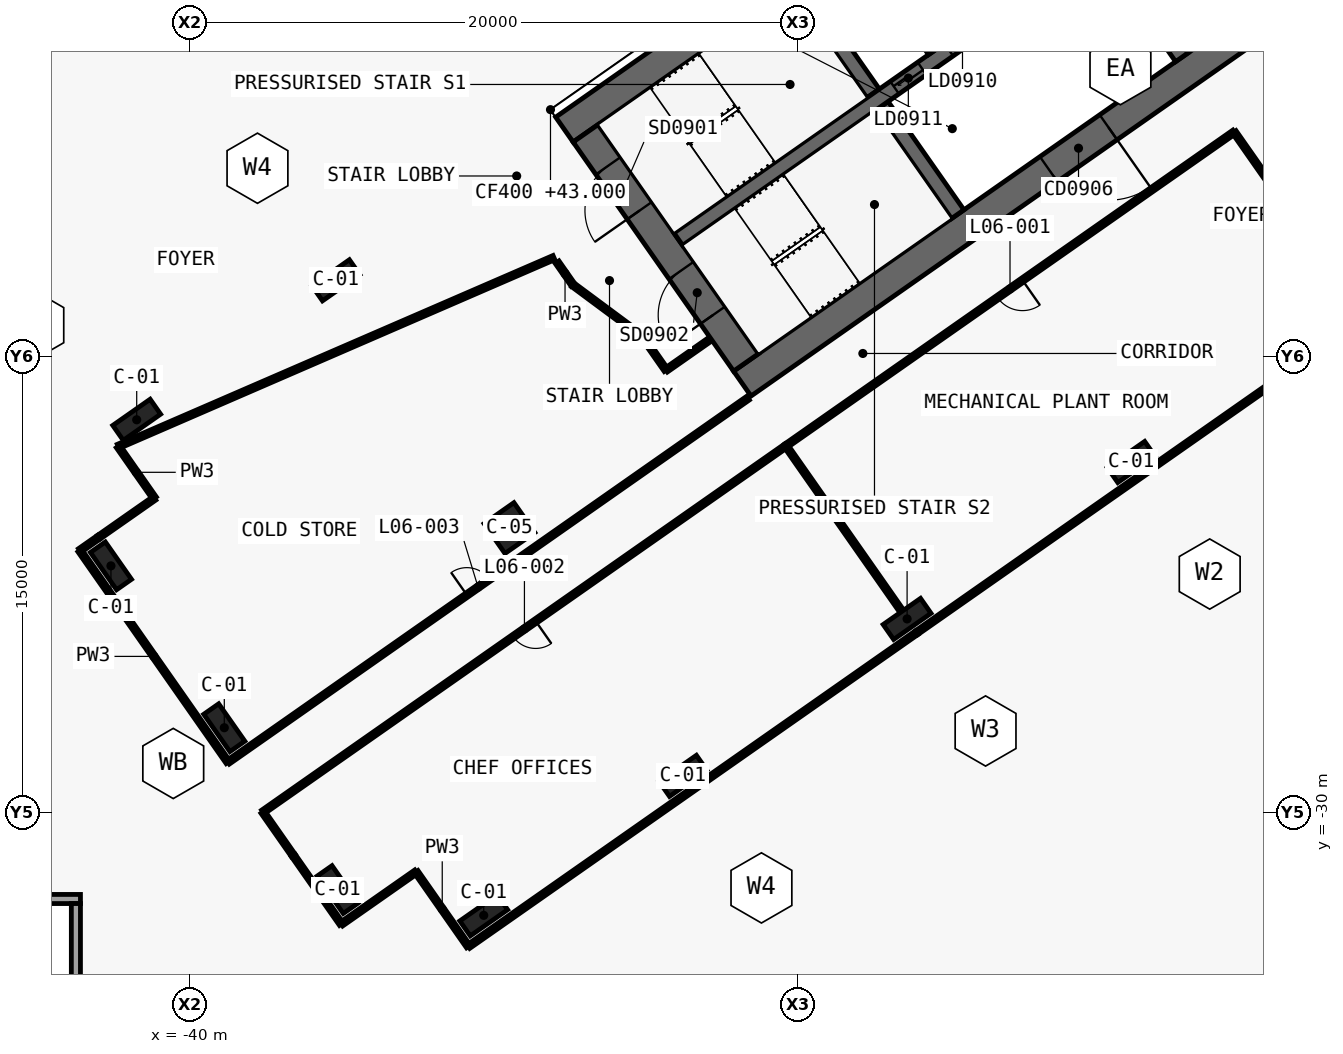
"""IFC4 building model, lengths in metres.
Left out: names, types, materials, properties, quantities, classifications, styles, units other than length and angle.
Written with IfcOpenShell. Run it as: python <this file> out.ifc"""

import sys

from ifc_helpers import new_model, si_unit, direction, frame, frame_2d, origin, origin_2d, place, context, subcontext, project, spatial, polyline, rectangle, outline, extrude, element, fill, save


model = new_model("IFC4")
c1 = context("Model", 3, precision=1e-05, world=origin(), true_north=direction((0.0, 1.0)))
c2 = subcontext(c1, "Body", "Model", "MODEL_VIEW")
j1 = project(units=[si_unit("LENGTHUNIT", "METRE"), si_unit("PLANEANGLEUNIT", "RADIAN")], contexts=[c1])
p1 = place(None, origin())
s1 = spatial("IfcSite", under=j1, at=p1, CompositionType="ELEMENT")
p2 = place(p1, origin())
s2 = spatial("IfcBuilding", under=s1, at=p2, CompositionType="ELEMENT")
p3 = place(p2, frame((0.0, 0.0, 43.0)))
s3 = spatial("IfcBuildingStorey", under=s2, at=p3, CompositionType="ELEMENT", Elevation=43.0)
p4 = place(p3, frame((0.037, 11.867, 0.0), z_axis=(0.0, 0.0, 1.0), x_axis=(-0.819155306259, -0.573571777746, 0.0)))
e1 = element("IfcWall", 1, at=p4, inside=s3, PredefinedType="SHEAR", context=c2, shape_type="SweptSolid", body=[
    extrude(outline(polyline([(33.837, 0.5), (0.7, 0.5), (0.0, -0.5), (33.837, -0.5), (33.837, 0.5)])), origin(), (0.0, 0.0, 1.0), 5.5),
])
p5 = place(p3, frame((0.037, -0.585, 0.0), z_axis=(0.0, 0.0, 1.0), x_axis=(-0.819157152511, -0.573569140985, 0.0)))
e2 = element("IfcWall", 2, at=p5, inside=s3, PredefinedType="SHEAR", context=c2, shape_type="SweptSolid", body=[
    extrude(outline(polyline([(26.695, 0.5), (0.7, 0.5), (0.0, -0.5), (26.695, -0.5), (26.695, 0.5)])), origin(), (0.0, 0.0, 1.0), 5.5),
])
p6 = place(p5, frame((2.995, 0.0, 0.0)))
e3 = element("IfcOpeningElement", 3, at=p6, cuts=e2, PredefinedType="OPENING", context=c2, shape_type="SweptSolid", body=[
    extrude(rectangle(XDim=2.4, YDim=2.1, at=frame_2d((1.2, 1.05))), frame((0.0, 0.51, 0.0), z_axis=(0.0, -1.0, 0.0), x_axis=(1.0, 0.0, 0.0)), (0.0, 0.0, 1.0), 1.02),
])
p7 = place(p5, frame((11.995, 0.0, 0.0)))
e4 = element("IfcOpeningElement", 4, at=p7, cuts=e2, PredefinedType="OPENING", context=c2, shape_type="SweptSolid", body=[
    extrude(rectangle(XDim=2.4, YDim=2.1, at=frame_2d((1.2, 1.05))), frame((0.0, 0.51, 0.0), z_axis=(0.0, -1.0, 0.0), x_axis=(1.0, 0.0, 0.0)), (0.0, 0.0, 1.0), 1.02),
])
p8 = place(p3, frame((-21.708, -15.2, 0.0), z_axis=(0.0, 0.0, 1.0), x_axis=(-0.573576324356, 0.819152122709, 0.0)))
e5 = element("IfcWall", 5, at=p8, inside=s3, PredefinedType="SHEAR", context=c2, shape_type="SweptSolid", body=[
    extrude(outline(polyline([(0.0, 0.5), (0.0, -0.5), (9.2, -0.5), (9.2, 0.5), (0.0, 0.5)])), origin(), (0.0, 0.0, 1.0), 5.5),
])
p9 = place(p8, frame((6.1, 0.0, 0.0)))
e6 = element("IfcOpeningElement", 6, at=p9, cuts=e5, PredefinedType="OPENING", context=c2, shape_type="SweptSolid", body=[
    extrude(rectangle(XDim=1.8, YDim=2.1, at=frame_2d((0.9, 1.05))), frame((0.0, 0.51, 0.0), z_axis=(0.0, -1.0, 0.0), x_axis=(1.0, 0.0, 0.0)), (0.0, 0.0, 1.0), 1.02),
])
p10 = place(p8, frame((1.9, 0.0, 0.0)))
e7 = element("IfcOpeningElement", 7, at=p10, cuts=e5, PredefinedType="OPENING", context=c2, shape_type="SweptSolid", body=[
    extrude(rectangle(XDim=1.8, YDim=2.1, at=frame_2d((0.9, 1.05))), frame((0.0, 0.51, 0.0), z_axis=(0.0, -1.0, 0.0), x_axis=(1.0, 0.0, 0.0)), (0.0, 0.0, 1.0), 1.02),
])
p11 = place(p3, frame((-7.372, -5.162, 0.0), z_axis=(0.0, 0.0, 1.0), x_axis=(-0.573594173421, 0.819139624372, 0.0)))
e8 = element("IfcWall", 8, at=p11, inside=s3, PredefinedType="SHEAR", context=c2, shape_type="SweptSolid", body=[
    extrude(outline(polyline([(4.35, 0.25), (0.0, 0.25), (0.0, -0.25), (4.35, -0.25), (4.35, 0.25)])), origin(), (0.0, 0.0, 1.0), 5.5),
])
p12 = place(p3, frame((-14.745, -10.324, 0.0), z_axis=(0.0, 0.0, 1.0), x_axis=(-0.57356780395, 0.819158088694, 0.0)))
e9 = element("IfcWall", 9, at=p12, inside=s3, PredefinedType="SHEAR", context=c2, shape_type="SweptSolid", body=[
    extrude(outline(polyline([(4.35, 0.25), (0.0, 0.25), (0.0, -0.25), (4.35, -0.25), (4.35, 0.25)])), origin(), (0.0, 0.0, 1.0), 5.5),
])
p13 = place(p3, frame((-17.527, -6.352, 0.0), z_axis=(0.0, 0.0, 1.0), x_axis=(-0.573530143085, 0.819184457233, 0.0)))
e10 = element("IfcWall", 10, at=p13, inside=s3, PredefinedType="SHEAR", context=c2, shape_type="SweptSolid", body=[
    extrude(outline(polyline([(4.35, -0.25), (4.35, 0.25), (0.0, 0.25), (0.0, -0.25), (4.35, -0.25)])), origin(), (0.0, 0.0, 1.0), 5.5),
])
p14 = place(p3, frame((-2.638, 3.768, 0.0), z_axis=(0.0, 0.0, 1.0), x_axis=(-0.819148977158, -0.573580816643, 0.0)))
e11 = element("IfcWall", 11, at=p14, inside=s3, PredefinedType="SHEAR", context=c2, shape_type="SweptSolid", body=[
    extrude(outline(polyline([(26.0, 0.25), (0.0, 0.25), (0.0, -0.25), (26.0, -0.25), (26.0, 0.25)])), origin(), (0.0, 0.0, 1.0), 5.5),
])
p15 = place(p14, frame((1.169, 0.0, 0.0)))
e12 = element("IfcOpeningElement", 12, at=p15, cuts=e11, PredefinedType="OPENING", context=c2, shape_type="SweptSolid", body=[
    extrude(rectangle(XDim=1.1, YDim=2.1, at=frame_2d((0.55, 1.05))), frame((0.0, 0.26, 0.0), z_axis=(0.0, -1.0, 0.0), x_axis=(1.0, 0.0, 0.0)), (0.0, 0.0, 1.0), 0.52),
])
p16 = place(p14, frame((3.206, 0.0, 0.0)))
e13 = element("IfcOpeningElement", 13, at=p16, cuts=e11, PredefinedType="OPENING", context=c2, shape_type="SweptSolid", body=[
    extrude(rectangle(XDim=1.1, YDim=2.1, at=frame_2d((0.55, 1.05))), frame((0.0, 0.26, 0.0), z_axis=(0.0, -1.0, 0.0), x_axis=(1.0, 0.0, 0.0)), (0.0, 0.0, 1.0), 0.52),
])
p17 = place(p14, frame((5.244, 0.0, 0.0)))
e14 = element("IfcOpeningElement", 14, at=p17, cuts=e11, PredefinedType="OPENING", context=c2, shape_type="SweptSolid", body=[
    extrude(rectangle(XDim=1.1, YDim=2.1, at=frame_2d((0.55, 1.05))), frame((0.0, 0.26, 0.0), z_axis=(0.0, -1.0, 0.0), x_axis=(1.0, 0.0, 0.0)), (0.0, 0.0, 1.0), 0.52),
])
p18 = place(p14, frame((7.281, 0.0, 0.0)))
e15 = element("IfcOpeningElement", 15, at=p18, cuts=e11, PredefinedType="OPENING", context=c2, shape_type="SweptSolid", body=[
    extrude(rectangle(XDim=1.1, YDim=2.1, at=frame_2d((0.55, 1.05))), frame((0.0, 0.26, 0.0), z_axis=(0.0, -1.0, 0.0), x_axis=(1.0, 0.0, 0.0)), (0.0, 0.0, 1.0), 0.52),
])
p19 = place(p14, frame((9.688, 0.0, 0.0)))
e16 = element("IfcOpeningElement", 16, at=p19, cuts=e11, PredefinedType="OPENING", context=c2, shape_type="SweptSolid", body=[
    extrude(rectangle(XDim=1.1, YDim=2.1, at=frame_2d((0.55, 1.05))), frame((0.0, 0.26, 0.0), z_axis=(0.0, -1.0, 0.0), x_axis=(1.0, 0.0, 0.0)), (0.0, 0.0, 1.0), 0.52),
])
p20 = place(p14, frame((11.863, 0.0, 0.0)))
e17 = element("IfcOpeningElement", 17, at=p20, cuts=e11, PredefinedType="OPENING", context=c2, shape_type="SweptSolid", body=[
    extrude(rectangle(XDim=1.1, YDim=2.1, at=frame_2d((0.55, 1.05))), frame((0.0, 0.26, 0.0), z_axis=(0.0, -1.0, 0.0), x_axis=(1.0, 0.0, 0.0)), (0.0, 0.0, 1.0), 0.52),
])
p21 = place(p14, frame((14.038, 0.0, 0.0)))
e18 = element("IfcOpeningElement", 18, at=p21, cuts=e11, PredefinedType="OPENING", context=c2, shape_type="SweptSolid", body=[
    extrude(rectangle(XDim=1.1, YDim=2.1, at=frame_2d((0.55, 1.05))), frame((0.0, 0.26, 0.0), z_axis=(0.0, -1.0, 0.0), x_axis=(1.0, 0.0, 0.0)), (0.0, 0.0, 1.0), 0.52),
])
p22 = place(p14, frame((16.212, 0.0, 0.0)))
e19 = element("IfcOpeningElement", 19, at=p22, cuts=e11, PredefinedType="OPENING", context=c2, shape_type="SweptSolid", body=[
    extrude(rectangle(XDim=1.1, YDim=2.1, at=frame_2d((0.55, 1.05))), frame((0.0, 0.26, 0.0), z_axis=(0.0, -1.0, 0.0), x_axis=(1.0, 0.0, 0.0)), (0.0, 0.0, 1.0), 0.52),
])
p23 = place(p3, frame((-49.4, -32.85, 0.0), z_axis=(0.0, 0.0, 1.0), x_axis=(1.0, 0.0, 0.0)))
e20 = element("IfcWall", 20, at=p23, inside=s3, PredefinedType="SOLIDWALL", context=c2, shape_type="SweptSolid", body=[
    extrude(rectangle(XDim=5.8, YDim=0.3, at=frame_2d((2.9, 0.0))), origin(), (0.0, 0.0, 1.0), 5.5),
])
p24 = place(p3, frame((-43.75, -43.0, 0.0), z_axis=(0.0, 0.0, 1.0), x_axis=(0.0, 1.0, 0.0)))
e21 = element("IfcWall", 21, at=p24, inside=s3, PredefinedType="SOLIDWALL", context=c2, shape_type="SweptSolid", body=[
    extrude(rectangle(XDim=10.0, YDim=0.3, at=frame_2d((5.0, 0.0))), origin(), (0.0, 0.0, 1.0), 5.5),
])
p25 = place(p24, frame((0.212, 0.0, 0.0)))
e22 = element("IfcOpeningElement", 22, at=p25, cuts=e21, PredefinedType="OPENING", context=c2, shape_type="SweptSolid", body=[
    extrude(rectangle(XDim=2.1, YDim=2.1, at=frame_2d((1.05, 1.05))), frame((0.0, 0.16, 0.0), z_axis=(0.0, -1.0, 0.0), x_axis=(1.0, 0.0, 0.0)), (0.0, 0.0, 1.0), 0.32),
])
for number, where, z_axis, x_axis in (
    (23, (-9.038, -18.475, 0.0), (0.0, 0.0, 1.0), (-0.819, -0.574, 0.0)),
    (24, (-16.41, -23.637, 0.0), (0.0, 0.0, 1.0), (-0.819, -0.574, 0.0)),
    (25, (-23.782, -28.799, 0.0), (0.0, 0.0, 1.0), (-0.819, -0.574, 0.0)),
    (26, (-30.336, -33.388, 0.0), (0.0, 0.0, 1.0), (-0.819, -0.574, 0.0)),
    (27, (-35.197, -12.498, 0.0), (0.0, 0.0, 1.0), (-0.819, -0.574, 0.0)),
    (28, (-41.75, -17.087, 0.0), (0.0, 0.0, 1.0), (-0.819, -0.574, 0.0)),
    (29, (-35.14, -32.541, 0.0), (0.0, 0.0, 1.0), (-0.574, 0.819, 0.0)),
    (30, (-38.869, -27.216, 0.0), (0.0, 0.0, 1.0), (-0.574, 0.819, 0.0)),
    (31, (-42.597, -21.892, 0.0), (0.0, 0.0, 1.0), (-0.574, 0.819, 0.0)),
):
    element("IfcColumn", number, at=place(p3, frame(where, z_axis=z_axis, x_axis=x_axis)), inside=s3, PredefinedType="COLUMN", context=c2, shape_type="SweptSolid", body=[
        extrude(rectangle(XDim=1.5, YDim=0.6, at=origin_2d()), origin(), (0.0, 0.0, 1.0), 5.5),
    ])
p26 = place(p3, frame((-29.49, -20.649, 0.0), z_axis=(0.0, 0.0, 1.0), x_axis=(-0.819152044289, -0.573576436351, 0.0)))
e32 = element("IfcColumn", 32, at=p26, inside=s3, PredefinedType="COLUMN", context=c2, shape_type="SweptSolid", body=[
    extrude(rectangle(XDim=1.2, YDim=1.2, at=origin_2d()), origin(), (0.0, 0.0, 1.0), 5.5),
])
p27 = place(p3, frame((-15.622, -5.018, 0.0), z_axis=(0.0, 0.0, 1.0), x_axis=(-0.573594173421, 0.819139624372, 0.0)))
e33 = element("IfcWall", 33, at=p27, inside=s3, PredefinedType="SOLIDWALL", context=c2, shape_type="SweptSolid", body=[
    extrude(rectangle(XDim=4.35, YDim=0.2, at=frame_2d((2.175, 0.0))), origin(), (0.0, 0.0, 1.0), 5.5),
])
p28 = place(p3, frame((-38.746, -28.351, 0.0), z_axis=(0.0, 0.0, 1.0), x_axis=(0.819148965066, 0.573580833911, 0.0)))
e34 = element("IfcWall", 34, at=p28, inside=s3, PredefinedType="PARTITIONING", context=c2, shape_type="SweptSolid", body=[
    extrude(rectangle(XDim=20.88, YDim=0.15, at=frame_2d((10.44, 0.0))), origin(), (0.0, 0.0, 1.0), 4.4),
])
p29 = place(p28, frame((9.59, 0.0, 0.0)))
e35 = element("IfcOpeningElement", 35, at=p29, cuts=e34, PredefinedType="OPENING", context=c2, shape_type="SweptSolid", body=[
    extrude(rectangle(XDim=0.9, YDim=2.1, at=frame_2d((0.45, 1.05))), frame((0.0, 0.085, 0.0), z_axis=(0.0, -1.0, 0.0), x_axis=(1.0, 0.0, 0.0)), (0.0, 0.0, 1.0), 0.17),
])
p30 = place(p3, frame((-5.652, -7.62, 0.0), z_axis=(0.0, 0.0, 1.0), x_axis=(-0.819147172988, -0.573583393228, 0.0)))
e36 = element("IfcWall", 36, at=p30, inside=s3, PredefinedType="PARTITIONING", context=c2, shape_type="SweptSolid", body=[
    extrude(rectangle(XDim=18.002, YDim=0.15, at=frame_2d((9.001, 0.0))), origin(), (0.0, 0.0, 1.0), 4.5),
])
p31 = place(p30, frame((8.501, 0.0, 0.0)))
e37 = element("IfcOpeningElement", 37, at=p31, cuts=e36, PredefinedType="OPENING", context=c2, shape_type="SweptSolid", body=[
    extrude(rectangle(XDim=1.0, YDim=2.1, at=frame_2d((0.5, 1.05))), frame((0.0, 0.085, 0.0), z_axis=(0.0, -1.0, 0.0), x_axis=(1.0, 0.0, 0.0)), (0.0, 0.0, 1.0), 0.17),
])
p32 = place(p3, frame((-20.395, -17.943, 0.0), z_axis=(0.0, 0.0, 1.0), x_axis=(-0.819154909514, -0.573572344364, 0.0)))
e38 = element("IfcWall", 38, at=p32, inside=s3, PredefinedType="PARTITIONING", context=c2, shape_type="SweptSolid", body=[
    extrude(rectangle(XDim=21.002, YDim=0.15, at=frame_2d((10.501, 0.0))), origin(), (0.0, 0.0, 1.0), 4.4),
])
p33 = place(p32, frame((10.051, 0.0, 0.0)))
e39 = element("IfcOpeningElement", 39, at=p33, cuts=e38, PredefinedType="OPENING", context=c2, shape_type="SweptSolid", body=[
    extrude(rectangle(XDim=0.9, YDim=2.1, at=frame_2d((0.45, 1.05))), frame((0.0, 0.085, 0.0), z_axis=(0.0, -1.0, 0.0), x_axis=(1.0, 0.0, 0.0)), (0.0, 0.0, 1.0), 0.17),
])
p34 = place(p3, frame((-16.095, -24.09, 0.0), z_axis=(0.0, 0.0, 1.0), x_axis=(0.819143409619, 0.57358876774, 0.0)))
e40 = element("IfcWall", 40, at=p34, inside=s3, PredefinedType="PARTITIONING", context=c2, shape_type="SweptSolid", body=[
    extrude(rectangle(XDim=15.552, YDim=0.15, at=frame_2d((7.776, 0.0))), origin(), (0.0, 0.0, 1.0), 4.08),
])
p35 = place(p3, frame((-35.017, -33.676, 0.0), z_axis=(0.0, 0.0, 1.0), x_axis=(0.81917072002, 0.573549763719, 0.0)))
e41 = element("IfcWall", 41, at=p35, inside=s3, PredefinedType="PARTITIONING", context=c2, shape_type="SweptSolid", body=[
    extrude(rectangle(XDim=2.999, YDim=0.15, at=frame_2d((1.5, 0.0))), origin(), (0.0, 0.0, 1.0), 4.4),
])
p36 = place(p3, frame((-32.56, -31.956, 0.0), z_axis=(0.0, 0.0, 1.0), x_axis=(0.573604390867, -0.819132469615, 0.0)))
e42 = element("IfcWall", 42, at=p36, inside=s3, PredefinedType="PARTITIONING", context=c2, shape_type="SweptSolid", body=[
    extrude(rectangle(XDim=2.999, YDim=0.15, at=frame_2d((1.5, 0.0))), origin(), (0.0, 0.0, 1.0), 4.4),
])
p37 = place(p3, frame((-30.839, -34.413, 0.0), z_axis=(0.0, 0.0, 1.0), x_axis=(0.819149083218, 0.573580665175, 0.0)))
e43 = element("IfcWall", 43, at=p37, inside=s3, PredefinedType="PARTITIONING", context=c2, shape_type="SweptSolid", body=[
    extrude(rectangle(XDim=18.002, YDim=0.15, at=frame_2d((9.001, 0.0))), origin(), (0.0, 0.0, 1.0), 5.1),
])
p38 = place(p3, frame((-36.599, -31.418, 0.0), z_axis=(0.0, 0.0, 1.0), x_axis=(0.57362881286, -0.819115367367, 0.0)))
e44 = element("IfcWall", 44, at=p38, inside=s3, PredefinedType="PARTITIONING", context=c2, shape_type="SweptSolid", body=[
    extrude(rectangle(XDim=2.756, YDim=0.15, at=frame_2d((1.378, 0.0))), origin(), (0.0, 0.0, 1.0), 5.1),
])
p39 = place(p3, frame((-42.359, -17.961, 0.0), z_axis=(0.0, 0.0, 1.0), x_axis=(0.573603984281, -0.819132754331, 0.0)))
e45 = element("IfcWall", 45, at=p39, inside=s3, PredefinedType="PARTITIONING", context=c2, shape_type="SweptSolid", body=[
    extrude(rectangle(XDim=2.082, YDim=0.15, at=frame_2d((1.041, 0.0))), origin(), (0.0, 0.0, 1.0), 4.4),
])
p40 = place(p3, frame((-41.165, -19.667, 0.0), z_axis=(0.0, 0.0, 1.0), x_axis=(-0.819149945048, -0.573579434366, 0.0)))
e46 = element("IfcWall", 46, at=p40, inside=s3, PredefinedType="PARTITIONING", context=c2, shape_type="SweptSolid", body=[
    extrude(rectangle(XDim=2.239, YDim=0.15, at=frame_2d((1.119, 0.0))), origin(), (0.0, 0.0, 1.0), 4.4),
])
p41 = place(p3, frame((-43.622, -21.387, 0.0), z_axis=(0.0, 0.0, 1.0), x_axis=(0.573487395822, -0.819214383928, 0.0)))
e47 = element("IfcWall", 47, at=p41, inside=s3, PredefinedType="PARTITIONING", context=c2, shape_type="SweptSolid", body=[
    extrude(rectangle(XDim=8.503, YDim=0.15, at=frame_2d((4.251, 0.0))), origin(), (0.0, 0.0, 1.0), 5.1),
])
p42 = place(p3, frame((-43.0, -20.952, 0.0), z_axis=(0.0, 0.0, 1.0), x_axis=(-0.819216809636, -0.573483930734, 0.0)))
e48 = element("IfcWall", 48, at=p42, inside=s3, PredefinedType="PARTITIONING", context=c2, shape_type="SweptSolid", body=[
    extrude(rectangle(XDim=0.759, YDim=0.15, at=frame_2d((0.379, 0.0))), origin(), (0.0, 0.0, 1.0), 5.1),
])
p43 = place(p3, frame((-37.6, -29.988, 0.0), z_axis=(0.0, 0.0, 1.0), x_axis=(0.573518712821, -0.819192459709, 0.0)))
e49 = element("IfcWall", 49, at=p43, inside=s3, PredefinedType="PARTITIONING", context=c2, shape_type="SweptSolid", body=[
    extrude(rectangle(XDim=1.744, YDim=0.15, at=frame_2d((0.872, 0.0))), origin(), (0.0, 0.0, 1.0), 5.1),
])
p44 = place(p3, frame((-1.849, -13.051, 0.0), z_axis=(0.0, 0.0, 1.0), x_axis=(-0.573575988258, 0.819152358047, 0.0)))
e50 = element("IfcWall", 50, at=p44, inside=s3, PredefinedType="PARTITIONING", context=c2, shape_type="SweptSolid", body=[
    extrude(rectangle(XDim=6.632, YDim=0.15, at=frame_2d((3.316, 0.0))), origin(), (0.0, 0.0, 1.0), 4.5),
])
p45 = place(p3, frame((-28.026, -11.751, 0.0), z_axis=(0.0, 0.0, 1.0), x_axis=(-0.91753357696, -0.397658314577, 0.0)))
e51 = element("IfcWall", 51, at=p45, inside=s3, PredefinedType="PARTITIONING", context=c2, shape_type="SweptSolid", body=[
    extrude(rectangle(XDim=15.621, YDim=0.15, at=frame_2d((7.811, 0.0))), origin(), (0.0, 0.0, 1.0), 4.4),
])
p46 = place(p3, frame((-22.961, -14.49, 0.0), z_axis=(0.0, 0.0, 1.0), x_axis=(-0.819109000826, -0.573637903879, 0.0)))
e52 = element("IfcWall", 52, at=p46, inside=s3, PredefinedType="PARTITIONING", context=c2, shape_type="SweptSolid", body=[
    extrude(rectangle(XDim=1.68, YDim=0.15, at=frame_2d((0.84, 0.0))), origin(), (0.0, 0.0, 1.0), 5.1),
])
p47 = place(p3, frame((-24.337, -15.454, 0.0), z_axis=(0.0, 0.0, 1.0), x_axis=(-0.573571252353, 0.819155674139, 0.0)))
e53 = element("IfcWall", 53, at=p47, inside=s3, PredefinedType="PARTITIONING", context=c2, shape_type="SweptSolid", body=[
    extrude(rectangle(XDim=1.354, YDim=0.15, at=frame_2d((0.677, 0.0))), origin(), (0.0, 0.0, 1.0), 5.1),
])
p48 = place(p3, frame((-25.114, -14.345, 0.0), z_axis=(0.0, 0.0, 1.0), x_axis=(-0.803169525988, 0.59575054555, 0.0)))
e54 = element("IfcWall", 54, at=p48, inside=s3, PredefinedType="PARTITIONING", context=c2, shape_type="SweptSolid", body=[
    extrude(rectangle(XDim=2.846, YDim=0.15, at=frame_2d((1.423, 0.0))), origin(), (0.0, 0.0, 1.0), 5.1),
])
p49 = place(p3, frame((-27.4, -12.649, 0.0), z_axis=(0.0, 0.0, 1.0), x_axis=(-0.573713979357, 0.819055718428, 0.0)))
e55 = element("IfcWall", 55, at=p49, inside=s3, PredefinedType="PARTITIONING", context=c2, shape_type="SweptSolid", body=[
    extrude(rectangle(XDim=0.912, YDim=0.15, at=frame_2d((0.456, 0.0))), origin(), (0.0, 0.0, 1.0), 5.1),
])
p50 = place(p3, frame((-16.594, -23.375, 0.0), z_axis=(0.0, 0.0, 1.0), x_axis=(-0.57359826181, 0.819136761505, 0.0)))
e56 = element("IfcWall", 56, at=p50, inside=s3, PredefinedType="PARTITIONING", context=c2, shape_type="SweptSolid", body=[
    extrude(rectangle(XDim=6.63, YDim=0.15, at=frame_2d((3.315, 0.0))), origin(), (0.0, 0.0, 1.0), 4.5),
])
p51 = place(p22, origin())
e57 = element("IfcDoor", 57, at=p51, inside=s3, OperationType="SLIDING_TO_RIGHT", PredefinedType="DOOR", context=c2, shape_type="SweptSolid", body=[
    extrude(rectangle(XDim=1.1, YDim=2.1, at=frame_2d((0.55, 1.05))), frame((0.0, 0.025, 0.0), z_axis=(0.0, -1.0, 0.0), x_axis=(1.0, 0.0, 0.0)), (0.0, 0.0, 1.0), 0.05),
])
fill(e19, e57)
p52 = place(p7, origin())
e58 = element("IfcDoor", 58, at=p52, inside=s3, OperationType="DOUBLE_DOOR_SINGLE_SWING", PredefinedType="DOOR", context=c2, shape_type="SweptSolid", body=[
    extrude(rectangle(XDim=2.4, YDim=2.1, at=frame_2d((1.2, 1.05))), frame((0.0, 0.025, 0.0), z_axis=(0.0, -1.0, 0.0), x_axis=(1.0, 0.0, 0.0)), (0.0, 0.0, 1.0), 0.05),
])
fill(e4, e58)
p53 = place(p9, origin())
e59 = element("IfcDoor", 59, at=p53, inside=s3, OperationType="DOUBLE_DOOR_SINGLE_SWING", PredefinedType="DOOR", context=c2, shape_type="SweptSolid", body=[
    extrude(rectangle(XDim=1.8, YDim=2.1, at=frame_2d((0.9, 1.05))), frame((0.0, 0.025, 0.0), z_axis=(0.0, -1.0, 0.0), x_axis=(1.0, 0.0, 0.0)), (0.0, 0.0, 1.0), 0.05),
])
fill(e6, e59)
p54 = place(p10, origin())
e60 = element("IfcDoor", 60, at=p54, inside=s3, OperationType="DOUBLE_DOOR_SINGLE_SWING", PredefinedType="DOOR", context=c2, shape_type="SweptSolid", body=[
    extrude(rectangle(XDim=1.8, YDim=2.1, at=frame_2d((0.9, 1.05))), frame((0.0, 0.025, 0.0), z_axis=(0.0, -1.0, 0.0), x_axis=(1.0, 0.0, 0.0)), (0.0, 0.0, 1.0), 0.05),
])
fill(e7, e60)
p55 = place(p31, origin())
e61 = element("IfcDoor", 61, at=p55, inside=s3, OperationType="SINGLE_SWING_LEFT", PredefinedType="DOOR", context=c2, shape_type="SweptSolid", body=[
    extrude(rectangle(XDim=1.0, YDim=2.1, at=frame_2d((0.5, 1.05))), frame((0.0, 0.025, 0.0), z_axis=(0.0, -1.0, 0.0), x_axis=(1.0, 0.0, 0.0)), (0.0, 0.0, 1.0), 0.05),
])
fill(e37, e61)
p56 = place(p33, origin())
e62 = element("IfcDoor", 62, at=p56, inside=s3, OperationType="SINGLE_SWING_LEFT", PredefinedType="DOOR", context=c2, shape_type="SweptSolid", body=[
    extrude(rectangle(XDim=0.9, YDim=2.1, at=frame_2d((0.45, 1.05))), frame((0.0, 0.025, 0.0), z_axis=(0.0, -1.0, 0.0), x_axis=(1.0, 0.0, 0.0)), (0.0, 0.0, 1.0), 0.05),
])
fill(e39, e62)
p57 = place(p29, origin())
e63 = element("IfcDoor", 63, at=p57, inside=s3, OperationType="SINGLE_SWING_LEFT", PredefinedType="DOOR", context=c2, shape_type="SweptSolid", body=[
    extrude(rectangle(XDim=0.9, YDim=2.1, at=frame_2d((0.45, 1.05))), frame((0.0, 0.025, 0.0), z_axis=(0.0, -1.0, 0.0), x_axis=(1.0, 0.0, 0.0)), (0.0, 0.0, 1.0), 0.05),
])
fill(e35, e63)
save(model, sys.argv[1])
